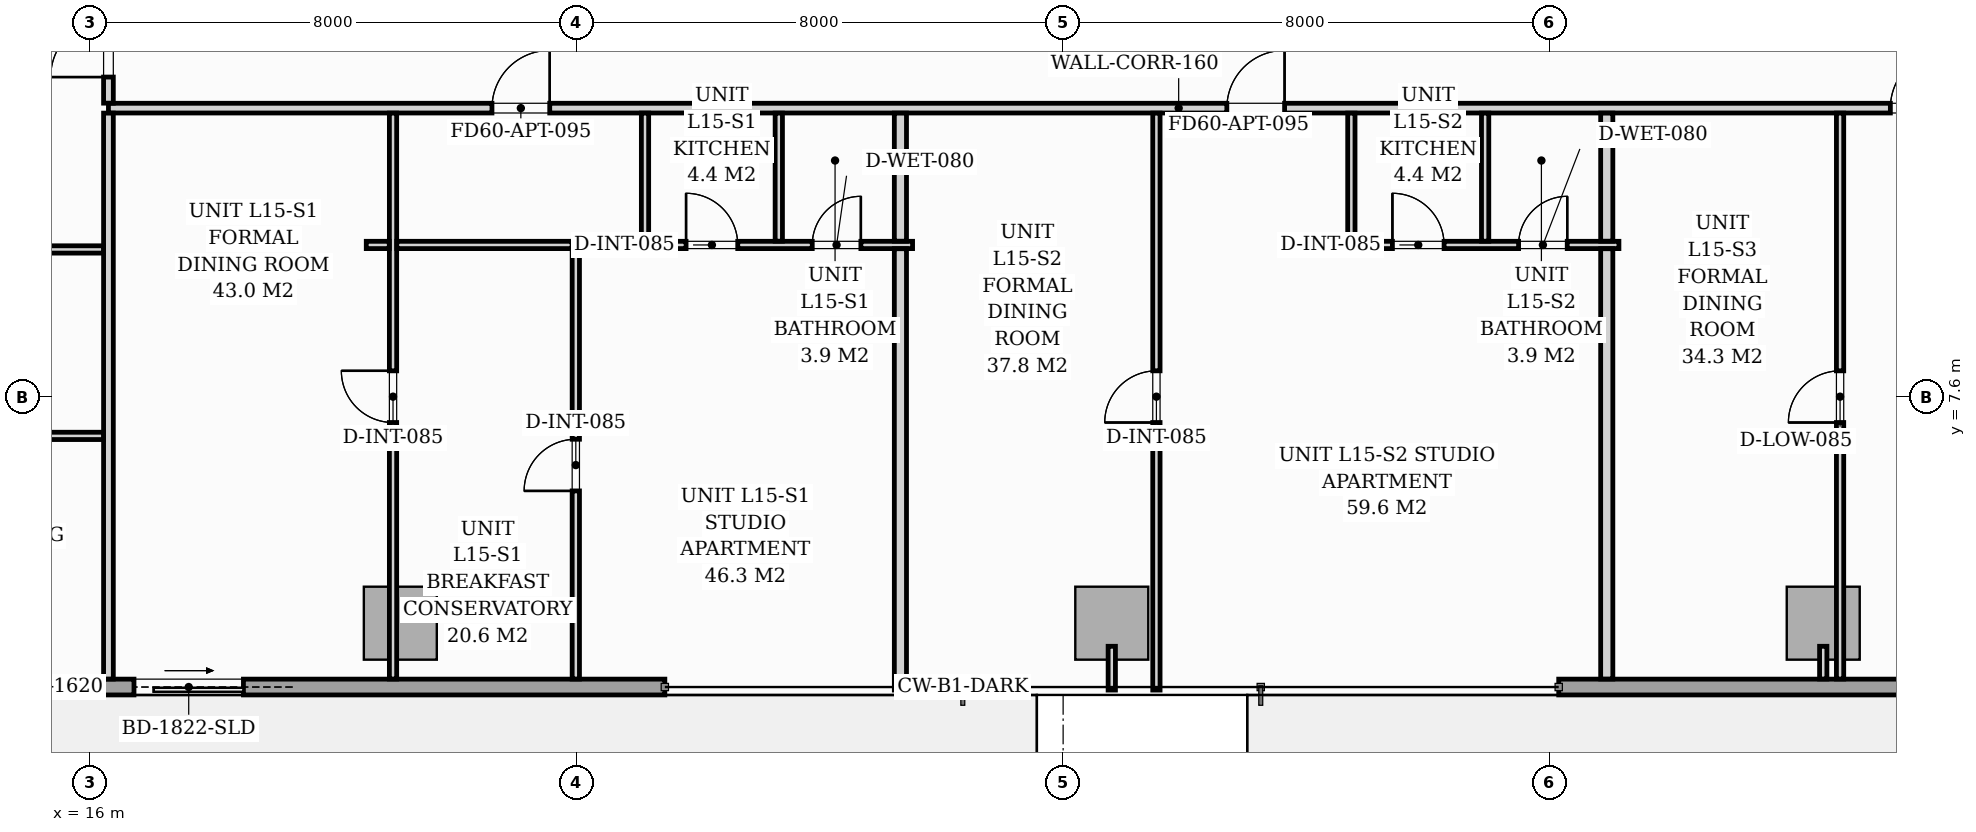
"""IFC4 building model, lengths in metres.
Left out: names, types, materials, properties, quantities, classifications, styles, units other than length and angle.
Written with IfcOpenShell. Run it as: python <this file> out.ifc"""

import sys

from ifc_helpers import new_model, si_unit, direction, frame, frame_2d, origin, origin_2d, place, context, subcontext, project, spatial, rectangle, extrude, source, transform, mapped, element, fill, save


model = new_model("IFC4")
c1 = context("Model", 3, precision=1e-05, world=origin(), true_north=direction((0.0, 1.0)))
c2 = subcontext(c1, "Body", "Model", "MODEL_VIEW")
j1 = project(units=[si_unit("LENGTHUNIT", "METRE"), si_unit("PLANEANGLEUNIT", "RADIAN")], contexts=[c1])
p1 = place(None, origin())
s1 = spatial("IfcSite", under=j1, at=p1, CompositionType="ELEMENT")
p2 = place(p1, origin())
s2 = spatial("IfcBuilding", under=s1, at=p2, CompositionType="ELEMENT")
p3 = place(p2, frame((0.0, 0.0, 55.0)))
s3 = spatial("IfcBuildingStorey", under=s2, at=p3, CompositionType="ELEMENT", Elevation=55.0)
m1 = source(origin(), c2, "Body", "SweptSolid", [
    extrude(rectangle(XDim=1.2, YDim=1.2, at=origin_2d()), origin(), (0.0, 0.0, 1.0), 3.196),
])
for number, where, z_axis, x_axis in (
    (1, (21.1, 3.88, 0.002), (0.0, 0.0, 1.0), (1.0, 0.0, 0.0)),
    (2, (32.8, 3.88, 0.002), (0.0, 0.0, 1.0), (1.0, 0.0, 0.0)),
    (3, (44.5, 3.88, 0.002), (0.0, 0.0, 1.0), (1.0, 0.0, 0.0)),
):
    element("IfcColumn", number, at=place(p3, frame(where, z_axis=z_axis, x_axis=x_axis)), inside=s3, PredefinedType="COLUMN", context=c2, shape_type="MappedRepresentation", body=[
        mapped(m1, transform((0.0, 0.0, 0.0), scale=1.0)),
    ])
p4 = place(p3, frame((57.3, 2.83, 0.0), z_axis=(0.0, 0.0, 1.0), x_axis=(-1.0, 0.0, 0.0)))
e4 = element("IfcWall", 4, at=p4, inside=s3, PredefinedType="STANDARD", context=c2, shape_type="SweptSolid", body=[
    extrude(rectangle(XDim=17.15, YDim=0.26, at=frame_2d((8.575, 0.0))), origin(), (0.0, 0.0, 1.0), 2.94),
])
p5 = place(p4, frame((8.362, 0.0, 0.0)))
e5 = element("IfcOpeningElement", 5, at=p5, cuts=e4, PredefinedType="OPENING", context=c2, shape_type="SweptSolid", body=[
    extrude(rectangle(XDim=1.8, YDim=2.06, at=frame_2d((0.9, 1.03))), frame((0.0, 0.14, 0.0), z_axis=(0.0, -1.0, 0.0), x_axis=(1.0, 0.0, 0.0)), (0.0, 0.0, 1.0), 0.28),
])
p6 = place(p4, frame((2.05, 0.0, 0.65)))
e6 = element("IfcOpeningElement", 6, at=p6, cuts=e4, PredefinedType="OPENING", context=c2, shape_type="SweptSolid", body=[
    extrude(rectangle(XDim=1.6, YDim=1.5, at=frame_2d((0.8, 0.75))), frame((0.0, 0.14, 0.0), z_axis=(0.0, -1.0, 0.0), x_axis=(1.0, 0.0, 0.0)), (0.0, 0.0, 1.0), 0.28),
])
p7 = place(p3, frame((25.45, 2.83, 0.0), z_axis=(0.0, 0.0, 1.0), x_axis=(-1.0, 0.0, 0.0)))
e7 = element("IfcWall", 7, at=p7, inside=s3, PredefinedType="STANDARD", context=c2, shape_type="SweptSolid", body=[
    extrude(rectangle(XDim=17.15, YDim=0.26, at=frame_2d((8.575, 0.0))), origin(), (0.0, 0.0, 1.0), 2.94),
])
p8 = place(p7, frame((6.93, 0.0, 0.0)))
e8 = element("IfcOpeningElement", 8, at=p8, cuts=e7, PredefinedType="OPENING", context=c2, shape_type="SweptSolid", body=[
    extrude(rectangle(XDim=1.8, YDim=2.06, at=frame_2d((0.9, 1.03))), frame((0.0, 0.14, 0.0), z_axis=(0.0, -1.0, 0.0), x_axis=(1.0, 0.0, 0.0)), (0.0, 0.0, 1.0), 0.28),
])
p9 = place(p7, frame((9.7, 0.0, 0.65)))
e9 = element("IfcOpeningElement", 9, at=p9, cuts=e7, PredefinedType="OPENING", context=c2, shape_type="SweptSolid", body=[
    extrude(rectangle(XDim=1.6, YDim=1.5, at=frame_2d((0.8, 0.75))), frame((0.0, 0.14, 0.0), z_axis=(0.0, -1.0, 0.0), x_axis=(1.0, 0.0, 0.0)), (0.0, 0.0, 1.0), 0.28),
])
p10 = place(p3, frame((16.3, 12.35, 0.0), z_axis=(0.0, 0.0, 1.0), x_axis=(1.0, 0.0, 0.0)))
e10 = element("IfcWall", 10, at=p10, inside=s3, PredefinedType="PARTITIONING", context=c2, shape_type="SweptSolid", body=[
    extrude(rectangle(XDim=35.2, YDim=0.16, at=frame_2d((17.6, 0.0))), origin(), (0.0, 0.0, 1.0), 2.94),
])
p11 = place(p10, frame((6.307, 0.0, 0.0)))
e11 = element("IfcOpeningElement", 11, at=p11, cuts=e10, PredefinedType="OPENING", context=c2, shape_type="SweptSolid", body=[
    extrude(rectangle(XDim=0.95, YDim=2.06, at=frame_2d((0.475, 1.03))), frame((0.0, 0.09, 0.0), z_axis=(0.0, -1.0, 0.0), x_axis=(1.0, 0.0, 0.0)), (0.0, 0.0, 1.0), 0.18),
])
p12 = place(p10, frame((18.392, 0.0, 0.0)))
e12 = element("IfcOpeningElement", 12, at=p12, cuts=e10, PredefinedType="OPENING", context=c2, shape_type="SweptSolid", body=[
    extrude(rectangle(XDim=0.95, YDim=2.06, at=frame_2d((0.475, 1.03))), frame((0.0, 0.09, 0.0), z_axis=(0.0, -1.0, 0.0), x_axis=(1.0, 0.0, 0.0)), (0.0, 0.0, 1.0), 0.18),
])
p13 = place(p10, frame((29.304, 0.0, 0.0)))
e13 = element("IfcOpeningElement", 13, at=p13, cuts=e10, PredefinedType="OPENING", context=c2, shape_type="SweptSolid", body=[
    extrude(rectangle(XDim=0.95, YDim=2.06, at=frame_2d((0.475, 1.03))), frame((0.0, 0.09, 0.0), z_axis=(0.0, -1.0, 0.0), x_axis=(1.0, 0.0, 0.0)), (0.0, 0.0, 1.0), 0.18),
])
p14 = place(p3, frame((16.3, 2.962, 0.0), z_axis=(0.0, 0.0, 1.0), x_axis=(0.0, 1.0, 0.0)))
e14 = element("IfcWall", 14, at=p14, inside=s3, PredefinedType="PARTITIONING", context=c2, shape_type="SweptSolid", body=[
    extrude(rectangle(XDim=9.306, YDim=0.16, at=frame_2d((4.653, 0.0))), origin(), (0.0, 0.0, 1.0), 2.94),
])
p15 = place(p3, frame((16.3, 12.432, 0.0), z_axis=(0.0, 0.0, 1.0), x_axis=(0.0, 1.0, 0.0)))
e15 = element("IfcWall", 15, at=p15, inside=s3, PredefinedType="PARTITIONING", context=c2, shape_type="SweptSolid", body=[
    extrude(rectangle(XDim=15.006, YDim=0.16, at=frame_2d((7.503, 0.0))), origin(), (0.0, 0.0, 1.0), 2.94),
])
p16 = place(p15, frame((0.429, 0.0, 0.0)))
e16 = element("IfcOpeningElement", 16, at=p16, cuts=e15, PredefinedType="OPENING", context=c2, shape_type="SweptSolid", body=[
    extrude(rectangle(XDim=0.95, YDim=2.06, at=frame_2d((0.475, 1.03))), frame((0.0, 0.09, 0.0), z_axis=(0.0, -1.0, 0.0), x_axis=(1.0, 0.0, 0.0)), (0.0, 0.0, 1.0), 0.18),
])
p17 = place(p3, frame((25.124, 10.1, 0.0), z_axis=(0.0, 0.0, 1.0), x_axis=(1.0, 0.0, 0.0)))
e17 = element("IfcWall", 17, at=p17, inside=s3, PredefinedType="PARTITIONING", context=c2, shape_type="SweptSolid", body=[
    extrude(rectangle(XDim=4.4, YDim=0.12, at=frame_2d((2.2, 0.0))), origin(), (0.0, 0.0, 1.0), 2.94),
])
p18 = place(p17, frame((0.675, 0.0, 0.0)))
e18 = element("IfcOpeningElement", 18, at=p18, cuts=e17, PredefinedType="OPENING", context=c2, shape_type="SweptSolid", body=[
    extrude(rectangle(XDim=0.85, YDim=2.05, at=frame_2d((0.425, 1.025))), frame((0.0, 0.07, 0.0), z_axis=(0.0, -1.0, 0.0), x_axis=(1.0, 0.0, 0.0)), (0.0, 0.0, 1.0), 0.14),
])
p19 = place(p17, frame((2.75, 0.0, 0.0)))
e19 = element("IfcOpeningElement", 19, at=p19, cuts=e17, PredefinedType="OPENING", context=c2, shape_type="SweptSolid", body=[
    extrude(rectangle(XDim=0.8, YDim=2.02, at=frame_2d((0.4, 1.01))), frame((0.0, 0.07, 0.0), z_axis=(0.0, -1.0, 0.0), x_axis=(1.0, 0.0, 0.0)), (0.0, 0.0, 1.0), 0.14),
])
for number, where, z_axis, x_axis in (
    (20, (25.124, 10.162, 0.0), (0.0, 0.0, 1.0), (0.0, 1.0, 0.0)),
    (21, (27.324, 10.162, 0.0), (0.0, 0.0, 1.0), (0.0, 1.0, 0.0)),
):
    element("IfcWall", number, at=place(p3, frame(where, z_axis=z_axis, x_axis=x_axis)), inside=s3, PredefinedType="PARTITIONING", context=c2, shape_type="SweptSolid", body=[
        extrude(rectangle(XDim=2.106, YDim=0.12, at=frame_2d((1.053, 0.0))), origin(), (0.0, 0.0, 1.0), 2.94),
    ])
p20 = place(p3, frame((20.98, 2.962, 0.0), z_axis=(0.0, 0.0, 1.0), x_axis=(0.0, 1.0, 0.0)))
e22 = element("IfcWall", 22, at=p20, inside=s3, PredefinedType="PARTITIONING", context=c2, shape_type="SweptSolid", body=[
    extrude(rectangle(XDim=9.306, YDim=0.12, at=frame_2d((4.653, 0.0))), origin(), (0.0, 0.0, 1.0), 2.94),
])
p21 = place(p20, frame((4.218, 0.0, 0.0)))
e23 = element("IfcOpeningElement", 23, at=p21, cuts=e22, PredefinedType="OPENING", context=c2, shape_type="SweptSolid", body=[
    extrude(rectangle(XDim=0.85, YDim=2.05, at=frame_2d((0.425, 1.025))), frame((0.0, 0.07, 0.0), z_axis=(0.0, -1.0, 0.0), x_axis=(1.0, 0.0, 0.0)), (0.0, 0.0, 1.0), 0.14),
])
p22 = place(p3, frame((23.986, 2.962, 0.0), z_axis=(0.0, 0.0, 1.0), x_axis=(0.0, 1.0, 0.0)))
e24 = element("IfcWall", 24, at=p22, inside=s3, PredefinedType="PARTITIONING", context=c2, shape_type="SweptSolid", body=[
    extrude(rectangle(XDim=7.138, YDim=0.12, at=frame_2d((3.569, 0.0))), origin(), (0.0, 0.0, 1.0), 2.94),
])
p23 = place(p22, frame((3.093, 0.0, 0.0)))
e25 = element("IfcOpeningElement", 25, at=p23, cuts=e24, PredefinedType="OPENING", context=c2, shape_type="SweptSolid", body=[
    extrude(rectangle(XDim=0.85, YDim=2.05, at=frame_2d((0.425, 1.025))), frame((0.0, 0.07, 0.0), z_axis=(0.0, -1.0, 0.0), x_axis=(1.0, 0.0, 0.0)), (0.0, 0.0, 1.0), 0.14),
])
p24 = place(p3, frame((20.54, 10.1, 0.0), z_axis=(0.0, 0.0, 1.0), x_axis=(1.0, 0.0, 0.0)))
e26 = element("IfcWall", 26, at=p24, inside=s3, PredefinedType="PARTITIONING", context=c2, shape_type="SweptSolid", body=[
    extrude(rectangle(XDim=0.378, YDim=0.12, at=frame_2d((0.189, 0.0))), origin(), (0.0, 0.0, 1.0), 2.94),
])
p25 = place(p3, frame((21.042, 10.1, 0.0), z_axis=(0.0, 0.0, 1.0), x_axis=(1.0, 0.0, 0.0)))
e27 = element("IfcWall", 27, at=p25, inside=s3, PredefinedType="PARTITIONING", context=c2, shape_type="SweptSolid", body=[
    extrude(rectangle(XDim=2.882, YDim=0.12, at=frame_2d((1.441, 0.0))), origin(), (0.0, 0.0, 1.0), 2.94),
])
p26 = place(p3, frame((29.324, 2.78, 0.0), z_axis=(0.0, 0.0, 1.0), x_axis=(0.0, 1.0, 0.0)))
e28 = element("IfcWall", 28, at=p26, inside=s3, PredefinedType="PARTITIONING", context=c2, shape_type="SweptSolid", body=[
    extrude(rectangle(XDim=7.258, YDim=0.2, at=frame_2d((3.629, 0.0))), origin(), (0.0, 0.0, 1.0), 2.94),
])
p27 = place(p3, frame((29.324, 10.162, 0.0), z_axis=(0.0, 0.0, 1.0), x_axis=(0.0, 1.0, 0.0)))
e29 = element("IfcWall", 29, at=p27, inside=s3, PredefinedType="PARTITIONING", context=c2, shape_type="SweptSolid", body=[
    extrude(rectangle(XDim=2.106, YDim=0.2, at=frame_2d((1.053, 0.0))), origin(), (0.0, 0.0, 1.0), 2.94),
])
p28 = place(p3, frame((36.74, 10.1, 0.0), z_axis=(0.0, 0.0, 1.0), x_axis=(1.0, 0.0, 0.0)))
e30 = element("IfcWall", 30, at=p28, inside=s3, PredefinedType="PARTITIONING", context=c2, shape_type="SweptSolid", body=[
    extrude(rectangle(XDim=4.4, YDim=0.12, at=frame_2d((2.2, 0.0))), origin(), (0.0, 0.0, 1.0), 2.94),
])
p29 = place(p28, frame((0.675, 0.0, 0.0)))
e31 = element("IfcOpeningElement", 31, at=p29, cuts=e30, PredefinedType="OPENING", context=c2, shape_type="SweptSolid", body=[
    extrude(rectangle(XDim=0.85, YDim=2.05, at=frame_2d((0.425, 1.025))), frame((0.0, 0.07, 0.0), z_axis=(0.0, -1.0, 0.0), x_axis=(1.0, 0.0, 0.0)), (0.0, 0.0, 1.0), 0.14),
])
p30 = place(p28, frame((2.75, 0.0, 0.0)))
e32 = element("IfcOpeningElement", 32, at=p30, cuts=e30, PredefinedType="OPENING", context=c2, shape_type="SweptSolid", body=[
    extrude(rectangle(XDim=0.8, YDim=2.02, at=frame_2d((0.4, 1.01))), frame((0.0, 0.07, 0.0), z_axis=(0.0, -1.0, 0.0), x_axis=(1.0, 0.0, 0.0)), (0.0, 0.0, 1.0), 0.14),
])
for number, where, z_axis, x_axis in (
    (33, (36.74, 10.162, 0.0), (0.0, 0.0, 1.0), (0.0, 1.0, 0.0)),
    (34, (38.94, 10.162, 0.0), (0.0, 0.0, 1.0), (0.0, 1.0, 0.0)),
):
    element("IfcWall", number, at=place(p3, frame(where, z_axis=z_axis, x_axis=x_axis)), inside=s3, PredefinedType="PARTITIONING", context=c2, shape_type="SweptSolid", body=[
        extrude(rectangle(XDim=2.106, YDim=0.12, at=frame_2d((1.053, 0.0))), origin(), (0.0, 0.0, 1.0), 2.94),
    ])
p31 = place(p3, frame((33.534, 2.78, 0.0), z_axis=(0.0, 0.0, 1.0), x_axis=(0.0, 1.0, 0.0)))
e35 = element("IfcWall", 35, at=p31, inside=s3, PredefinedType="PARTITIONING", context=c2, shape_type="SweptSolid", body=[
    extrude(rectangle(XDim=9.488, YDim=0.12, at=frame_2d((4.744, 0.0))), origin(), (0.0, 0.0, 1.0), 2.94),
])
p32 = place(p31, frame((4.4, 0.0, 0.0)))
e36 = element("IfcOpeningElement", 36, at=p32, cuts=e35, PredefinedType="OPENING", context=c2, shape_type="SweptSolid", body=[
    extrude(rectangle(XDim=0.85, YDim=2.05, at=frame_2d((0.425, 1.025))), frame((0.0, 0.07, 0.0), z_axis=(0.0, -1.0, 0.0), x_axis=(1.0, 0.0, 0.0)), (0.0, 0.0, 1.0), 0.14),
])
p33 = place(p3, frame((40.94, 2.962, 0.0), z_axis=(0.0, 0.0, 1.0), x_axis=(0.0, 1.0, 0.0)))
e37 = element("IfcWall", 37, at=p33, inside=s3, PredefinedType="PARTITIONING", context=c2, shape_type="SweptSolid", body=[
    extrude(rectangle(XDim=7.076, YDim=0.2, at=frame_2d((3.538, 0.0))), origin(), (0.0, 0.0, 1.0), 2.94),
])
p34 = place(p3, frame((40.94, 10.162, 0.0), z_axis=(0.0, 0.0, 1.0), x_axis=(0.0, 1.0, 0.0)))
e38 = element("IfcWall", 38, at=p34, inside=s3, PredefinedType="PARTITIONING", context=c2, shape_type="SweptSolid", body=[
    extrude(rectangle(XDim=2.106, YDim=0.2, at=frame_2d((1.053, 0.0))), origin(), (0.0, 0.0, 1.0), 2.94),
])
p35 = place(p3, frame((44.777, 2.962, 0.0), z_axis=(0.0, 0.0, 1.0), x_axis=(0.0, 1.0, 0.0)))
e39 = element("IfcWall", 39, at=p35, inside=s3, PredefinedType="PARTITIONING", context=c2, shape_type="SweptSolid", body=[
    extrude(rectangle(XDim=9.306, YDim=0.12, at=frame_2d((4.653, 0.0))), origin(), (0.0, 0.0, 1.0), 2.136),
])
p36 = place(p35, frame((4.218, 0.0, 0.0)))
e40 = element("IfcOpeningElement", 40, at=p36, cuts=e39, PredefinedType="OPENING", context=c2, shape_type="SweptSolid", body=[
    extrude(rectangle(XDim=0.85, YDim=2.01, at=frame_2d((0.425, 1.005))), frame((0.0, 0.07, 0.0), z_axis=(0.0, -1.0, 0.0), x_axis=(1.0, 0.0, 0.0)), (0.0, 0.0, 1.0), 0.14),
])
p37 = place(p3, frame((5.88, 6.96, 0.0), z_axis=(0.0, 0.0, 1.0), x_axis=(1.0, 0.0, 0.0)))
e41 = element("IfcWall", 41, at=p37, inside=s3, PredefinedType="PARTITIONING", context=c2, shape_type="SweptSolid", body=[
    extrude(rectangle(XDim=10.338, YDim=0.12, at=frame_2d((5.169, 0.0))), origin(), (0.0, 0.0, 1.0), 2.94),
])
p38 = place(p37, frame((4.735, 0.0, 0.0)))
e42 = element("IfcOpeningElement", 42, at=p38, cuts=e41, PredefinedType="OPENING", context=c2, shape_type="SweptSolid", body=[
    extrude(rectangle(XDim=0.85, YDim=2.05, at=frame_2d((0.425, 1.025))), frame((0.0, 0.07, 0.0), z_axis=(0.0, -1.0, 0.0), x_axis=(1.0, 0.0, 0.0)), (0.0, 0.0, 1.0), 0.14),
])
p39 = place(p3, frame((5.88, 10.026, 0.0), z_axis=(0.0, 0.0, 1.0), x_axis=(1.0, 0.0, 0.0)))
e43 = element("IfcWall", 43, at=p39, inside=s3, PredefinedType="PARTITIONING", context=c2, shape_type="SweptSolid", body=[
    extrude(rectangle(XDim=10.338, YDim=0.12, at=frame_2d((5.169, 0.0))), origin(), (0.0, 0.0, 1.0), 2.94),
])
p40 = place(p39, frame((4.735, 0.0, 0.0)))
e44 = element("IfcOpeningElement", 44, at=p40, cuts=e43, PredefinedType="OPENING", context=c2, shape_type="SweptSolid", body=[
    extrude(rectangle(XDim=0.85, YDim=2.05, at=frame_2d((0.425, 1.025))), frame((0.0, 0.07, 0.0), z_axis=(0.0, -1.0, 0.0), x_axis=(1.0, 0.0, 0.0)), (0.0, 0.0, 1.0), 0.14),
])
p41 = place(p3, frame((32.8, 3.5, 0.0), z_axis=(0.0, 0.0, 1.0), x_axis=(0.0, -1.0, 0.0)))
e45 = element("IfcWall", 45, at=p41, inside=s3, PredefinedType="PARTITIONING", context=c2, shape_type="SweptSolid", body=[
    extrude(rectangle(XDim=0.72, YDim=0.12, at=frame_2d((0.36, 0.0))), origin(), (0.0, 0.0, 1.0), 2.94),
])
p42 = place(p3, frame((44.5, 3.5, 0.0), z_axis=(0.0, 0.0, 1.0), x_axis=(0.0, -1.0, 0.0)))
e46 = element("IfcWall", 46, at=p42, inside=s3, PredefinedType="PARTITIONING", context=c2, shape_type="SweptSolid", body=[
    extrude(rectangle(XDim=0.538, YDim=0.12, at=frame_2d((0.269, 0.0))), origin(), (0.0, 0.0, 1.0), 2.94),
])
m2 = source(origin(), c2, "Body", "SweptSolid", [
    extrude(rectangle(XDim=1.8, YDim=2.06, at=frame_2d((0.9, 1.03))), frame((0.0, 0.025, 0.0), z_axis=(0.0, -1.0, 0.0), x_axis=(1.0, 0.0, 0.0)), (0.0, 0.0, 1.0), 0.05),
])
p43 = place(p8, origin())
e47 = element("IfcDoor", 47, at=p43, inside=s3, OperationType="SLIDING_TO_LEFT", PredefinedType="DOOR", context=c2, shape_type="MappedRepresentation", body=[
    mapped(m2, transform((0.0, 0.0, 0.0), scale=1.0)),
])
fill(e8, e47)
m3 = source(origin(), c2, "Body", "SweptSolid", [
    extrude(rectangle(XDim=1.6, YDim=1.5, at=frame_2d((0.8, 0.75))), frame((0.0, 0.03, 0.0), z_axis=(0.0, -1.0, 0.0), x_axis=(1.0, 0.0, 0.0)), (0.0, 0.0, 1.0), 0.06),
])
p44 = place(p9, origin())
e48 = element("IfcWindow", 48, at=p44, inside=s3, PartitioningType="SINGLE_PANEL", PredefinedType="WINDOW", context=c2, shape_type="MappedRepresentation", body=[
    mapped(m3, transform((0.0, 0.0, 0.0), scale=1.0)),
])
fill(e9, e48)
m4 = source(origin(), c2, "Body", "SweptSolid", [
    extrude(rectangle(XDim=0.85, YDim=2.05, at=frame_2d((0.425, 1.025))), frame((0.0, 0.025, 0.0), z_axis=(0.0, -1.0, 0.0), x_axis=(1.0, 0.0, 0.0)), (0.0, 0.0, 1.0), 0.05),
])
p45 = place(p21, origin())
e49 = element("IfcDoor", 49, at=p45, inside=s3, OperationType="SINGLE_SWING_RIGHT", PredefinedType="DOOR", context=c2, shape_type="MappedRepresentation", body=[
    mapped(m4, transform((0.0, 0.0, 0.0), scale=1.0)),
])
fill(e23, e49)
p46 = place(p23, origin())
e50 = element("IfcDoor", 50, at=p46, inside=s3, OperationType="SINGLE_SWING_LEFT", PredefinedType="DOOR", context=c2, shape_type="MappedRepresentation", body=[
    mapped(m4, transform((0.0, 0.0, 0.0), scale=1.0)),
])
fill(e25, e50)
m5 = source(origin(), c2, "Body", "SweptSolid", [
    extrude(rectangle(XDim=0.95, YDim=2.06, at=frame_2d((0.475, 1.03))), frame((0.0, 0.025, 0.0), z_axis=(0.0, -1.0, 0.0), x_axis=(1.0, 0.0, 0.0)), (0.0, 0.0, 1.0), 0.05),
])
p47 = place(p11, origin())
e51 = element("IfcDoor", 51, at=p47, inside=s3, OperationType="SINGLE_SWING_RIGHT", PredefinedType="DOOR", context=c2, shape_type="MappedRepresentation", body=[
    mapped(m5, transform((0.0, 0.0, 0.0), scale=1.0)),
])
fill(e11, e51)
p48 = place(p18, origin())
e52 = element("IfcDoor", 52, at=p48, inside=s3, OperationType="SINGLE_SWING_LEFT", PredefinedType="DOOR", context=c2, shape_type="MappedRepresentation", body=[
    mapped(m4, transform((0.0, 0.0, 0.0), scale=1.0)),
])
fill(e18, e52)
m6 = source(origin(), c2, "Body", "SweptSolid", [
    extrude(rectangle(XDim=0.8, YDim=2.02, at=frame_2d((0.4, 1.01))), frame((0.0, 0.025, 0.0), z_axis=(0.0, -1.0, 0.0), x_axis=(1.0, 0.0, 0.0)), (0.0, 0.0, 1.0), 0.05),
])
p49 = place(p19, origin())
e53 = element("IfcDoor", 53, at=p49, inside=s3, OperationType="SINGLE_SWING_RIGHT", PredefinedType="DOOR", context=c2, shape_type="MappedRepresentation", body=[
    mapped(m6, transform((0.0, 0.0, 0.0), scale=1.0)),
])
fill(e19, e53)
p50 = place(p32, origin())
e54 = element("IfcDoor", 54, at=p50, inside=s3, OperationType="SINGLE_SWING_LEFT", PredefinedType="DOOR", context=c2, shape_type="MappedRepresentation", body=[
    mapped(m4, transform((0.0, 0.0, 0.0), scale=1.0)),
])
fill(e36, e54)
p51 = place(p12, origin())
e55 = element("IfcDoor", 55, at=p51, inside=s3, OperationType="SINGLE_SWING_RIGHT", PredefinedType="DOOR", context=c2, shape_type="MappedRepresentation", body=[
    mapped(m5, transform((0.0, 0.0, 0.0), scale=1.0)),
])
fill(e12, e55)
p52 = place(p29, origin())
e56 = element("IfcDoor", 56, at=p52, inside=s3, OperationType="SINGLE_SWING_LEFT", PredefinedType="DOOR", context=c2, shape_type="MappedRepresentation", body=[
    mapped(m4, transform((0.0, 0.0, 0.0), scale=1.0)),
])
fill(e31, e56)
p53 = place(p30, origin())
e57 = element("IfcDoor", 57, at=p53, inside=s3, OperationType="SINGLE_SWING_RIGHT", PredefinedType="DOOR", context=c2, shape_type="MappedRepresentation", body=[
    mapped(m6, transform((0.0, 0.0, 0.0), scale=1.0)),
])
fill(e32, e57)
m7 = source(origin(), c2, "Body", "SweptSolid", [
    extrude(rectangle(XDim=0.85, YDim=2.01, at=frame_2d((0.425, 1.005))), frame((0.0, 0.025, 0.0), z_axis=(0.0, -1.0, 0.0), x_axis=(1.0, 0.0, 0.0)), (0.0, 0.0, 1.0), 0.05),
])
p54 = place(p36, origin())
e58 = element("IfcDoor", 58, at=p54, inside=s3, OperationType="SINGLE_SWING_LEFT", PredefinedType="DOOR", context=c2, shape_type="MappedRepresentation", body=[
    mapped(m7, transform((0.0, 0.0, 0.0), scale=1.0)),
])
fill(e40, e58)
p55 = place(p13, origin())
e59 = element("IfcDoor", 59, at=p55, inside=s3, OperationType="SINGLE_SWING_RIGHT", PredefinedType="DOOR", context=c2, shape_type="MappedRepresentation", body=[
    mapped(m5, transform((0.0, 0.0, 0.0), scale=1.0)),
])
fill(e13, e59)
p56 = place(p16, origin())
e60 = element("IfcDoor", 60, at=p56, inside=s3, OperationType="SINGLE_SWING_LEFT", PredefinedType="DOOR", context=c2, shape_type="MappedRepresentation", body=[
    mapped(m5, transform((0.0, 0.0, 0.0), scale=1.0)),
])
fill(e16, e60)
save(model, sys.argv[1])
